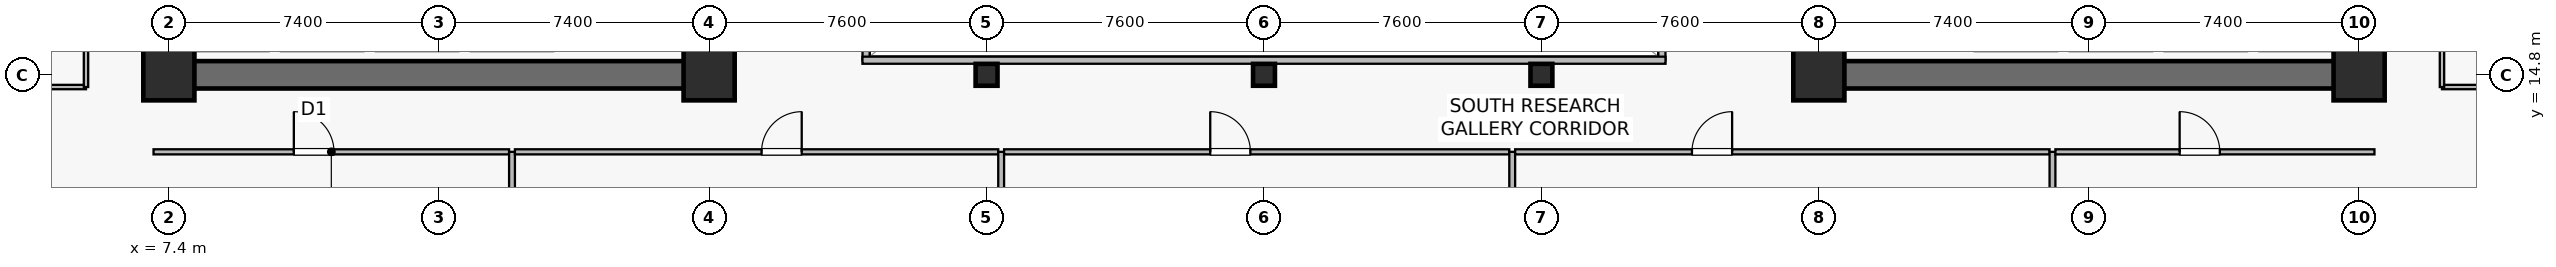
"""IFC4 building model, lengths in metres.
Left out: names, types, materials, properties, quantities, classifications, styles, units other than length and angle.
Written with IfcOpenShell. Run it as: python <this file> out.ifc"""

import sys

from ifc_helpers import new_model, si_unit, direction, frame, frame_2d, origin, origin_2d, place, context, subcontext, project, spatial, rectangle, hollow_rectangle, extrude, source, transform, mapped, element, fill, save


model = new_model("IFC4")
c1 = context("Model", 3, precision=1e-05, world=origin(), true_north=direction((0.0, 1.0)))
c2 = subcontext(c1, "Body", "Model", "MODEL_VIEW")
j1 = project(units=[si_unit("LENGTHUNIT", "METRE"), si_unit("PLANEANGLEUNIT", "RADIAN")], contexts=[c1])
p1 = place(None, origin())
s1 = spatial("IfcSite", under=j1, at=p1, CompositionType="ELEMENT")
p2 = place(p1, origin())
s2 = spatial("IfcBuilding", under=s1, at=p2, CompositionType="ELEMENT")
p3 = place(p2, frame((0.0, 0.0, 58.0)))
s3 = spatial("IfcBuildingStorey", under=s2, at=p3, CompositionType="ELEMENT", Elevation=58.0)
p4 = place(p3, frame((7.025, 14.8, 0.0), z_axis=(0.0, 0.0, 1.0), x_axis=(1.0, 0.0, 0.0)))
e1 = element("IfcWall", 1, at=p4, inside=s3, PredefinedType="SHEAR", context=c2, shape_type="SweptSolid", body=[
    extrude(rectangle(XDim=15.55, YDim=0.75, at=frame_2d((7.775, 0.0))), origin(), (0.0, 0.0, 1.0), 3.78),
])
p5 = place(p3, frame((7.4, 15.175, 0.0), z_axis=(0.0, 0.0, 1.0), x_axis=(0.0, 1.0, 0.0)))
e2 = element("IfcWall", 2, at=p5, inside=s3, PredefinedType="SHEAR", context=c2, shape_type="SweptSolid", body=[
    extrude(rectangle(XDim=18.25, YDim=0.75, at=frame_2d((9.125, 0.0))), origin(), (0.0, 0.0, 1.0), 3.78),
])
p6 = place(p3, frame((22.2, 15.175, 0.0), z_axis=(0.0, 0.0, 1.0), x_axis=(0.0, 1.0, 0.0)))
e3 = element("IfcWall", 3, at=p6, inside=s3, PredefinedType="SHEAR", context=c2, shape_type="SweptSolid", body=[
    extrude(rectangle(XDim=18.25, YDim=0.75, at=frame_2d((9.125, 0.0))), origin(), (0.0, 0.0, 1.0), 3.78),
])
p7 = place(p6, frame((3.375, 0.0, 0.0)))
e4 = element("IfcOpeningElement", 4, at=p7, cuts=e3, PredefinedType="OPENING", context=c2, shape_type="SweptSolid", body=[
    extrude(rectangle(XDim=1.42, YDim=2.2, at=frame_2d((0.71, 1.1))), frame((0.0, 0.385, 0.0), z_axis=(0.0, -1.0, 0.0), x_axis=(1.0, 0.0, 0.0)), (0.0, 0.0, 1.0), 0.77),
])
p8 = place(p3, frame((52.225, 14.8, 0.0), z_axis=(0.0, 0.0, 1.0), x_axis=(1.0, 0.0, 0.0)))
e5 = element("IfcWall", 5, at=p8, inside=s3, PredefinedType="SHEAR", context=c2, shape_type="SweptSolid", body=[
    extrude(rectangle(XDim=15.55, YDim=0.75, at=frame_2d((7.775, 0.0))), origin(), (0.0, 0.0, 1.0), 3.78),
])
p9 = place(p3, frame((52.6, 15.175, 0.0), z_axis=(0.0, 0.0, 1.0), x_axis=(0.0, 1.0, 0.0)))
e6 = element("IfcWall", 6, at=p9, inside=s3, PredefinedType="SHEAR", context=c2, shape_type="SweptSolid", body=[
    extrude(rectangle(XDim=18.25, YDim=0.75, at=frame_2d((9.125, 0.0))), origin(), (0.0, 0.0, 1.0), 3.78),
])
p10 = place(p9, frame((3.375, 0.0, 0.0)))
e7 = element("IfcOpeningElement", 7, at=p10, cuts=e6, PredefinedType="OPENING", context=c2, shape_type="SweptSolid", body=[
    extrude(rectangle(XDim=1.42, YDim=2.2, at=frame_2d((0.71, 1.1))), frame((0.0, 0.385, 0.0), z_axis=(0.0, -1.0, 0.0), x_axis=(1.0, 0.0, 0.0)), (0.0, 0.0, 1.0), 0.77),
])
p11 = place(p3, frame((67.4, 15.175, 0.0), z_axis=(0.0, 0.0, 1.0), x_axis=(0.0, 1.0, 0.0)))
e8 = element("IfcWall", 8, at=p11, inside=s3, PredefinedType="SHEAR", context=c2, shape_type="SweptSolid", body=[
    extrude(rectangle(XDim=18.25, YDim=0.75, at=frame_2d((9.125, 0.0))), origin(), (0.0, 0.0, 1.0), 3.78),
])
m1 = source(origin(), c2, "Body", "SweptSolid", [
    extrude(rectangle(XDim=1.4, YDim=1.4, at=origin_2d()), origin(), (0.0, 0.0, 1.0), 4.1),
])
for number, where, z_axis, x_axis in (
    (9, (7.4, 14.8, 0.0), (0.0, 0.0, 1.0), (1.0, 0.0, 0.0)),
    (10, (22.2, 14.8, 0.0), (0.0, 0.0, 1.0), (1.0, 0.0, 0.0)),
    (11, (52.6, 14.8, 0.0), (0.0, 0.0, 1.0), (1.0, 0.0, 0.0)),
    (12, (67.4, 14.8, 0.0), (0.0, 0.0, 1.0), (1.0, 0.0, 0.0)),
):
    element("IfcColumn", number, at=place(p3, frame(where, z_axis=z_axis, x_axis=x_axis)), inside=s3, PredefinedType="COLUMN", context=c2, shape_type="MappedRepresentation", body=[
        mapped(m1, transform((0.0, 0.0, 0.0), scale=1.0)),
    ])
m2 = source(origin(), c2, "Body", "SweptSolid", [
    extrude(hollow_rectangle(XDim=0.6, YDim=0.6, WallThickness=0.028, at=origin_2d()), origin(), (0.0, 0.0, 1.0), 4.1),
])
for number, where, z_axis, x_axis in (
    (13, (29.8, 14.8, 0.0), (0.0, 0.0, 1.0), (1.0, 0.0, 0.0)),
    (14, (37.4, 14.8, 0.0), (0.0, 0.0, 1.0), (1.0, 0.0, 0.0)),
    (15, (45.0, 14.8, 0.0), (0.0, 0.0, 1.0), (1.0, 0.0, 0.0)),
):
    element("IfcColumn", number, at=place(p3, frame(where, z_axis=z_axis, x_axis=x_axis)), inside=s3, PredefinedType="COLUMN", context=c2, shape_type="MappedRepresentation", body=[
        mapped(m2, transform((0.0, 0.0, 0.0), scale=1.0)),
    ])
p12 = place(p3, frame((26.5, 15.2, 0.0), z_axis=(0.0, 0.0, 1.0), x_axis=(0.0, 1.0, 0.0)))
e16 = element("IfcWall", 16, at=p12, inside=s3, PredefinedType="SOLIDWALL", context=c2, shape_type="SweptSolid", body=[
    extrude(rectangle(XDim=18.2, YDim=0.195, at=frame_2d((9.1, 0.0))), origin(), (0.0, 0.0, 1.0), 3.78),
])
p13 = place(p12, frame((1.8, 0.0, 0.9)))
e17 = element("IfcOpeningElement", 17, at=p13, cuts=e16, PredefinedType="OPENING", context=c2, shape_type="SweptSolid", body=[
    extrude(rectangle(XDim=1.5, YDim=1.4, at=frame_2d((0.75, 0.7))), frame((0.0, 0.107, 0.0), z_axis=(0.0, -1.0, 0.0), x_axis=(1.0, 0.0, 0.0)), (0.0, 0.0, 1.0), 0.215),
])
p14 = place(p12, frame((13.2, 0.0, 0.9)))
e18 = element("IfcOpeningElement", 18, at=p14, cuts=e16, PredefinedType="OPENING", context=c2, shape_type="SweptSolid", body=[
    extrude(rectangle(XDim=1.5, YDim=1.4, at=frame_2d((0.75, 0.7))), frame((0.0, 0.107, 0.0), z_axis=(0.0, -1.0, 0.0), x_axis=(1.0, 0.0, 0.0)), (0.0, 0.0, 1.0), 0.215),
])
p15 = place(p3, frame((48.3, 15.2, 0.0), z_axis=(0.0, 0.0, 1.0), x_axis=(0.0, 1.0, 0.0)))
e19 = element("IfcWall", 19, at=p15, inside=s3, PredefinedType="SOLIDWALL", context=c2, shape_type="SweptSolid", body=[
    extrude(rectangle(XDim=18.2, YDim=0.195, at=frame_2d((9.1, 0.0))), origin(), (0.0, 0.0, 1.0), 3.78),
])
p16 = place(p15, frame((1.8, 0.0, 0.9)))
e20 = element("IfcOpeningElement", 20, at=p16, cuts=e19, PredefinedType="OPENING", context=c2, shape_type="SweptSolid", body=[
    extrude(rectangle(XDim=1.5, YDim=1.4, at=frame_2d((0.75, 0.7))), frame((0.0, 0.107, 0.0), z_axis=(0.0, -1.0, 0.0), x_axis=(1.0, 0.0, 0.0)), (0.0, 0.0, 1.0), 0.215),
])
p17 = place(p15, frame((13.2, 0.0, 0.9)))
e21 = element("IfcOpeningElement", 21, at=p17, cuts=e19, PredefinedType="OPENING", context=c2, shape_type="SweptSolid", body=[
    extrude(rectangle(XDim=1.5, YDim=1.4, at=frame_2d((0.75, 0.7))), frame((0.0, 0.107, 0.0), z_axis=(0.0, -1.0, 0.0), x_axis=(1.0, 0.0, 0.0)), (0.0, 0.0, 1.0), 0.215),
])
p18 = place(p3, frame((26.4, 15.2, 0.0), z_axis=(0.0, 0.0, 1.0), x_axis=(1.0, 0.0, 0.0)))
e22 = element("IfcWall", 22, at=p18, inside=s3, PredefinedType="SOLIDWALL", context=c2, shape_type="SweptSolid", body=[
    extrude(rectangle(XDim=22.0, YDim=0.195, at=frame_2d((11.0, 0.0))), origin(), (0.0, 0.0, 1.0), 3.78),
])
p19 = place(p3, frame((6.98, 12.69, 0.0), z_axis=(0.0, 0.0, 1.0), x_axis=(1.0, 0.0, 0.0)))
e23 = element("IfcWall", 23, at=p19, inside=s3, PredefinedType="PARTITIONING", context=c2, shape_type="SweptSolid", body=[
    extrude(rectangle(XDim=9.74, YDim=0.14, at=frame_2d((4.87, 0.0))), origin(), (0.0, 0.0, 1.0), 3.065),
])
p20 = place(p19, frame((3.844, 0.0, 0.0)))
e24 = element("IfcOpeningElement", 24, at=p20, cuts=e23, PredefinedType="OPENING", context=c2, shape_type="SweptSolid", body=[
    extrude(rectangle(XDim=1.1, YDim=2.18, at=frame_2d((0.55, 1.09))), frame((0.0, 0.08, 0.0), z_axis=(0.0, -1.0, 0.0), x_axis=(1.0, 0.0, 0.0)), (0.0, 0.0, 1.0), 0.16),
])
p21 = place(p3, frame((16.8, 0.11, 0.0), z_axis=(0.0, 0.0, 1.0), x_axis=(0.0, 1.0, 0.0)))
e25 = element("IfcWall", 25, at=p21, inside=s3, PredefinedType="PARTITIONING", context=c2, shape_type="SweptSolid", body=[
    extrude(rectangle(XDim=12.58, YDim=0.16, at=frame_2d((6.29, 0.0))), origin(), (0.0, 0.0, 1.0), 3.015),
])
p22 = place(p3, frame((16.88, 12.69, 0.0), z_axis=(0.0, 0.0, 1.0), x_axis=(1.0, 0.0, 0.0)))
e26 = element("IfcWall", 26, at=p22, inside=s3, PredefinedType="PARTITIONING", context=c2, shape_type="SweptSolid", body=[
    extrude(rectangle(XDim=13.24, YDim=0.14, at=frame_2d((6.62, 0.0))), origin(), (0.0, 0.0, 1.0), 3.065),
])
p23 = place(p22, frame((6.756, 0.0, 0.0)))
e27 = element("IfcOpeningElement", 27, at=p23, cuts=e26, PredefinedType="OPENING", context=c2, shape_type="SweptSolid", body=[
    extrude(rectangle(XDim=1.1, YDim=2.18, at=frame_2d((0.55, 1.09))), frame((0.0, 0.08, 0.0), z_axis=(0.0, -1.0, 0.0), x_axis=(1.0, 0.0, 0.0)), (0.0, 0.0, 1.0), 0.16),
])
p24 = place(p3, frame((30.2, 1.31, 0.0), z_axis=(0.0, 0.0, 1.0), x_axis=(0.0, 1.0, 0.0)))
e28 = element("IfcWall", 28, at=p24, inside=s3, PredefinedType="PARTITIONING", context=c2, shape_type="SweptSolid", body=[
    extrude(rectangle(XDim=11.38, YDim=0.16, at=frame_2d((5.69, 0.0))), origin(), (0.0, 0.0, 1.0), 3.015),
])
p25 = place(p3, frame((30.28, 12.69, 0.0), z_axis=(0.0, 0.0, 1.0), x_axis=(1.0, 0.0, 0.0)))
e29 = element("IfcWall", 29, at=p25, inside=s3, PredefinedType="PARTITIONING", context=c2, shape_type="SweptSolid", body=[
    extrude(rectangle(XDim=13.84, YDim=0.14, at=frame_2d((6.92, 0.0))), origin(), (0.0, 0.0, 1.0), 3.065),
])
p26 = place(p25, frame((5.648, 0.0, 0.0)))
e30 = element("IfcOpeningElement", 30, at=p26, cuts=e29, PredefinedType="OPENING", context=c2, shape_type="SweptSolid", body=[
    extrude(rectangle(XDim=1.1, YDim=2.18, at=frame_2d((0.55, 1.09))), frame((0.0, 0.08, 0.0), z_axis=(0.0, -1.0, 0.0), x_axis=(1.0, 0.0, 0.0)), (0.0, 0.0, 1.0), 0.16),
])
p27 = place(p3, frame((44.2, 1.31, 0.0), z_axis=(0.0, 0.0, 1.0), x_axis=(0.0, 1.0, 0.0)))
e31 = element("IfcWall", 31, at=p27, inside=s3, PredefinedType="PARTITIONING", context=c2, shape_type="SweptSolid", body=[
    extrude(rectangle(XDim=11.38, YDim=0.16, at=frame_2d((5.69, 0.0))), origin(), (0.0, 0.0, 1.0), 3.015),
])
p28 = place(p3, frame((44.28, 12.69, 0.0), z_axis=(0.0, 0.0, 1.0), x_axis=(1.0, 0.0, 0.0)))
e32 = element("IfcWall", 32, at=p28, inside=s3, PredefinedType="PARTITIONING", context=c2, shape_type="SweptSolid", body=[
    extrude(rectangle(XDim=14.64, YDim=0.14, at=frame_2d((7.32, 0.0))), origin(), (0.0, 0.0, 1.0), 3.065),
])
p29 = place(p28, frame((4.844, 0.0, 0.0)))
e33 = element("IfcOpeningElement", 33, at=p29, cuts=e32, PredefinedType="OPENING", context=c2, shape_type="SweptSolid", body=[
    extrude(rectangle(XDim=1.1, YDim=2.18, at=frame_2d((0.55, 1.09))), frame((0.0, 0.08, 0.0), z_axis=(0.0, -1.0, 0.0), x_axis=(1.0, 0.0, 0.0)), (0.0, 0.0, 1.0), 0.16),
])
p30 = place(p3, frame((59.0, 0.11, 0.0), z_axis=(0.0, 0.0, 1.0), x_axis=(0.0, 1.0, 0.0)))
e34 = element("IfcWall", 34, at=p30, inside=s3, PredefinedType="PARTITIONING", context=c2, shape_type="SweptSolid", body=[
    extrude(rectangle(XDim=12.58, YDim=0.16, at=frame_2d((6.29, 0.0))), origin(), (0.0, 0.0, 1.0), 3.015),
])
p31 = place(p3, frame((59.08, 12.69, 0.0), z_axis=(0.0, 0.0, 1.0), x_axis=(1.0, 0.0, 0.0)))
e35 = element("IfcWall", 35, at=p31, inside=s3, PredefinedType="PARTITIONING", context=c2, shape_type="SweptSolid", body=[
    extrude(rectangle(XDim=8.74, YDim=0.14, at=frame_2d((4.37, 0.0))), origin(), (0.0, 0.0, 1.0), 3.065),
])
p32 = place(p31, frame((3.404, 0.0, 0.0)))
e36 = element("IfcOpeningElement", 36, at=p32, cuts=e35, PredefinedType="OPENING", context=c2, shape_type="SweptSolid", body=[
    extrude(rectangle(XDim=1.1, YDim=2.18, at=frame_2d((0.55, 1.09))), frame((0.0, 0.08, 0.0), z_axis=(0.0, -1.0, 0.0), x_axis=(1.0, 0.0, 0.0)), (0.0, 0.0, 1.0), 0.16),
])
p33 = place(p3, frame((0.11, 14.465, 0.0), z_axis=(0.0, 0.0, 1.0), x_axis=(1.0, 0.0, 0.0)))
e37 = element("IfcWall", 37, at=p33, inside=s3, PredefinedType="PARTITIONING", context=c2, shape_type="SweptSolid", body=[
    extrude(rectangle(XDim=5.02, YDim=0.12, at=frame_2d((2.51, 0.0))), origin(), (0.0, 0.0, 1.0), 3.78),
])
p34 = place(p3, frame((5.13, 14.465, 0.0), z_axis=(0.0, 0.0, 1.0), x_axis=(0.0, 1.0, 0.0)))
e38 = element("IfcWall", 38, at=p34, inside=s3, PredefinedType="PARTITIONING", context=c2, shape_type="SweptSolid", body=[
    extrude(rectangle(XDim=6.475, YDim=0.12, at=frame_2d((3.237, 0.0))), origin(), (0.0, 0.0, 1.0), 3.78),
])
p35 = place(p34, frame((2.788, 0.0, 0.0)))
e39 = element("IfcOpeningElement", 39, at=p35, cuts=e38, PredefinedType="OPENING", context=c2, shape_type="SweptSolid", body=[
    extrude(rectangle(XDim=0.9, YDim=2.1, at=frame_2d((0.45, 1.05))), frame((0.0, 0.07, 0.0), z_axis=(0.0, -1.0, 0.0), x_axis=(1.0, 0.0, 0.0)), (0.0, 0.0, 1.0), 0.14),
])
p36 = place(p3, frame((69.67, 14.465, 0.0), z_axis=(0.0, 0.0, 1.0), x_axis=(1.0, 0.0, 0.0)))
e40 = element("IfcWall", 40, at=p36, inside=s3, PredefinedType="PARTITIONING", context=c2, shape_type="SweptSolid", body=[
    extrude(rectangle(XDim=5.02, YDim=0.12, at=frame_2d((2.51, 0.0))), origin(), (0.0, 0.0, 1.0), 3.78),
])
p37 = place(p3, frame((69.67, 14.465, 0.0), z_axis=(0.0, 0.0, 1.0), x_axis=(0.0, 1.0, 0.0)))
e41 = element("IfcWall", 41, at=p37, inside=s3, PredefinedType="PARTITIONING", context=c2, shape_type="SweptSolid", body=[
    extrude(rectangle(XDim=4.475, YDim=0.12, at=frame_2d((2.237, 0.0))), origin(), (0.0, 0.0, 1.0), 3.78),
])
p38 = place(p37, frame((1.788, 0.0, 0.0)))
e42 = element("IfcOpeningElement", 42, at=p38, cuts=e41, PredefinedType="OPENING", context=c2, shape_type="SweptSolid", body=[
    extrude(rectangle(XDim=0.9, YDim=2.1, at=frame_2d((0.45, 1.05))), frame((0.0, 0.07, 0.0), z_axis=(0.0, -1.0, 0.0), x_axis=(1.0, 0.0, 0.0)), (0.0, 0.0, 1.0), 0.14),
])
m3 = source(origin(), c2, "Body", "SweptSolid", [
    extrude(rectangle(XDim=1.1, YDim=2.18, at=frame_2d((0.55, 1.09))), frame((0.0, 0.025, 0.0), z_axis=(0.0, -1.0, 0.0), x_axis=(1.0, 0.0, 0.0)), (0.0, 0.0, 1.0), 0.05),
])
p39 = place(p20, origin())
e43 = element("IfcDoor", 43, at=p39, inside=s3, OperationType="SINGLE_SWING_LEFT", PredefinedType="DOOR", context=c2, shape_type="MappedRepresentation", body=[
    mapped(m3, transform((0.0, 0.0, 0.0), scale=1.0)),
])
fill(e24, e43)
p40 = place(p23, origin())
e44 = element("IfcDoor", 44, at=p40, inside=s3, OperationType="SINGLE_SWING_RIGHT", PredefinedType="DOOR", context=c2, shape_type="MappedRepresentation", body=[
    mapped(m3, transform((0.0, 0.0, 0.0), scale=1.0)),
])
fill(e27, e44)
p41 = place(p26, origin())
e45 = element("IfcDoor", 45, at=p41, inside=s3, OperationType="SINGLE_SWING_LEFT", PredefinedType="DOOR", context=c2, shape_type="MappedRepresentation", body=[
    mapped(m3, transform((0.0, 0.0, 0.0), scale=1.0)),
])
fill(e30, e45)
p42 = place(p29, origin())
e46 = element("IfcDoor", 46, at=p42, inside=s3, OperationType="SINGLE_SWING_RIGHT", PredefinedType="DOOR", context=c2, shape_type="MappedRepresentation", body=[
    mapped(m3, transform((0.0, 0.0, 0.0), scale=1.0)),
])
fill(e33, e46)
p43 = place(p32, origin())
e47 = element("IfcDoor", 47, at=p43, inside=s3, OperationType="SINGLE_SWING_LEFT", PredefinedType="DOOR", context=c2, shape_type="MappedRepresentation", body=[
    mapped(m3, transform((0.0, 0.0, 0.0), scale=1.0)),
])
fill(e36, e47)
save(model, sys.argv[1])
